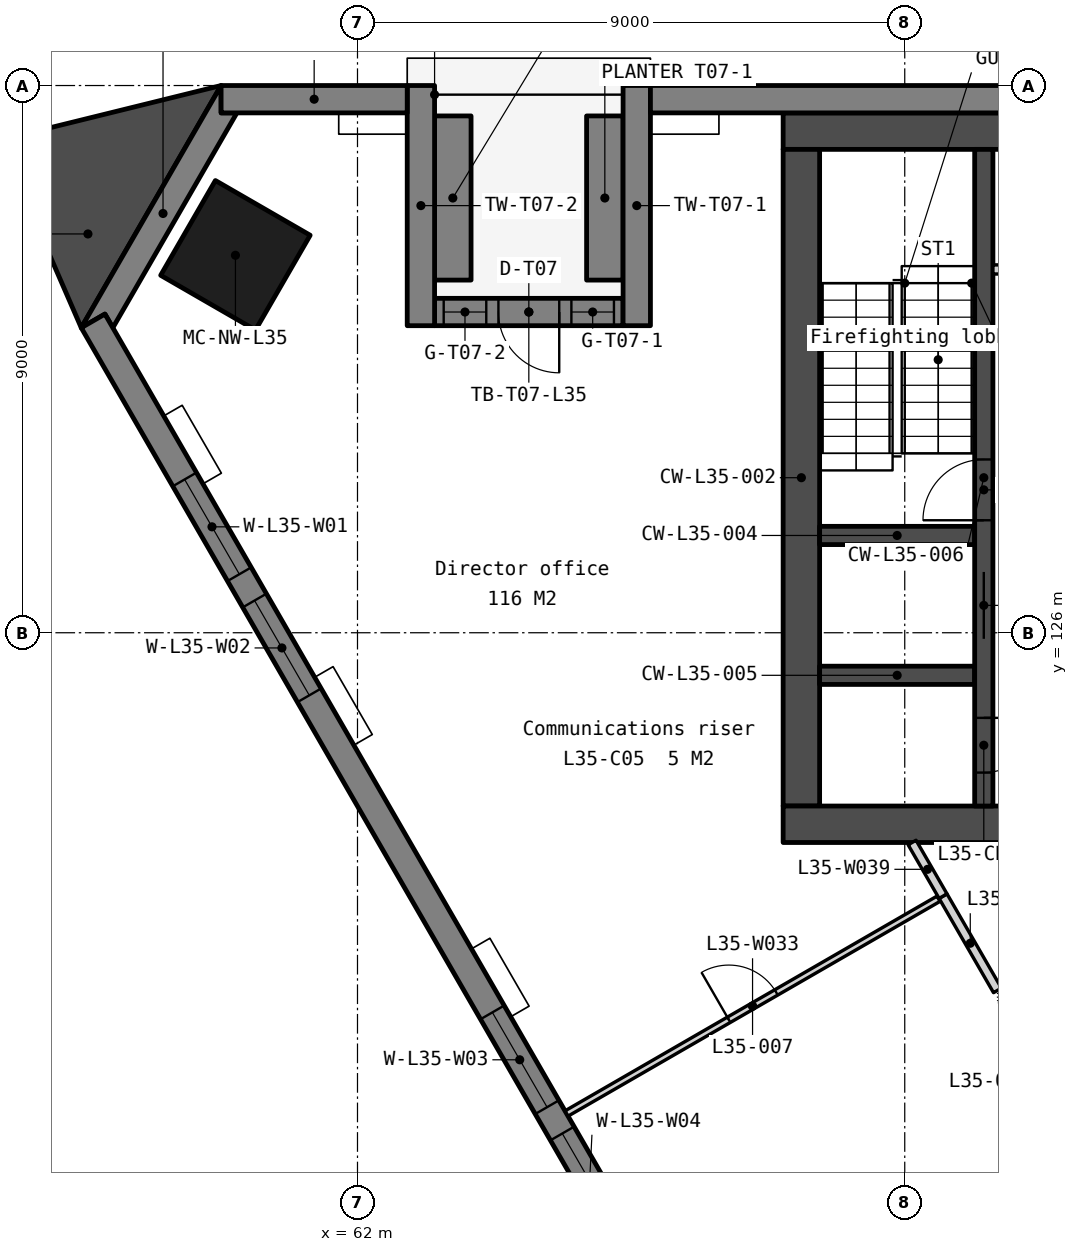
"""IFC4 building model, lengths in metres.
Left out: names, types, materials, properties, quantities, classifications, styles, units other than length and angle.
Written with IfcOpenShell. Run it as: python <this file> out.ifc"""

import sys

from ifc_helpers import new_model, si_unit, direction, frame, frame_2d, origin, origin_2d, place, context, subcontext, project, spatial, polyline, rectangle, outline, extrude, element, fill, save


model = new_model("IFC4")
c1 = context("Model", 3, precision=1e-05, world=origin(), true_north=direction((0.0, 1.0)))
c2 = subcontext(c1, "Body", "Model", "MODEL_VIEW")
j1 = project(units=[si_unit("LENGTHUNIT", "METRE"), si_unit("PLANEANGLEUNIT", "RADIAN")], contexts=[c1])
p1 = place(None, origin())
s1 = spatial("IfcSite", under=j1, at=p1, CompositionType="ELEMENT")
p2 = place(p1, origin())
s2 = spatial("IfcBuilding", under=s1, at=p2, CompositionType="ELEMENT")
p3 = place(p2, frame((0.0, 0.0, 140.3)))
s3 = spatial("IfcBuildingStorey", under=s2, at=p3, CompositionType="ELEMENT", Elevation=140.3)
p4 = place(p3, frame((59.993, 132.208, 0.0), z_axis=(0.0, 0.0, 1.0), x_axis=(-0.5, -0.866025403784, 0.0)))
e1 = element("IfcColumn", 1, at=p4, inside=s3, PredefinedType="COLUMN", context=c2, shape_type="SweptSolid", body=[
    extrude(rectangle(XDim=1.8, YDim=1.8, at=origin_2d()), origin(), (0.0, 0.0, 1.0), 3.9),
])
p5 = place(p3, frame((69.0, 134.25, 0.0), z_axis=(0.0, 0.0, 1.0), x_axis=(1.0, 0.0, 0.0)))
e2 = element("IfcWall", 2, at=p5, inside=s3, PredefinedType="SOLIDWALL", context=c2, shape_type="SweptSolid", body=[
    extrude(rectangle(XDim=22.0, YDim=0.6, at=frame_2d((11.0, 0.0))), origin(), (0.0, 0.0, 1.0), 3.75),
])
p6 = place(p3, frame((69.3, 133.95, 0.0), z_axis=(0.0, 0.0, 1.0), x_axis=(0.0, -1.0, 0.0)))
e3 = element("IfcWall", 3, at=p6, inside=s3, PredefinedType="SOLIDWALL", context=c2, shape_type="SweptSolid", body=[
    extrude(rectangle(XDim=10.8, YDim=0.6, at=frame_2d((5.4, 0.0))), origin(), (0.0, 0.0, 1.0), 3.75),
])
p7 = place(p3, frame((69.0, 122.85, 0.0), z_axis=(0.0, 0.0, 1.0), x_axis=(1.0, 0.0, 0.0)))
e4 = element("IfcWall", 4, at=p7, inside=s3, PredefinedType="SOLIDWALL", context=c2, shape_type="SweptSolid", body=[
    extrude(rectangle(XDim=22.0, YDim=0.6, at=frame_2d((11.0, 0.0))), origin(), (0.0, 0.0, 1.0), 3.75),
])
p8 = place(p7, frame((16.375, 0.0, 0.0)))
e5 = element("IfcOpeningElement", 5, at=p8, cuts=e4, PredefinedType="OPENING", context=c2, shape_type="SweptSolid", body=[
    extrude(rectangle(XDim=1.8, YDim=2.1, at=frame_2d((0.9, 1.05))), frame((0.0, 0.31, 0.0), z_axis=(0.0, -1.0, 0.0), x_axis=(1.0, 0.0, 0.0)), (0.0, 0.0, 1.0), 0.62),
])
p9 = place(p7, frame((3.825, 0.0, 0.0)))
e6 = element("IfcOpeningElement", 6, at=p9, cuts=e4, PredefinedType="OPENING", context=c2, shape_type="SweptSolid", body=[
    extrude(rectangle(XDim=1.8, YDim=2.1, at=frame_2d((0.9, 1.05))), frame((0.0, 0.31, 0.0), z_axis=(0.0, -1.0, 0.0), x_axis=(1.0, 0.0, 0.0)), (0.0, 0.0, 1.0), 0.62),
])
p10 = place(p7, frame((12.85, 0.0, 0.0)))
e7 = element("IfcOpeningElement", 7, at=p10, cuts=e4, PredefinedType="OPENING", context=c2, shape_type="SweptSolid", body=[
    extrude(rectangle(XDim=1.5, YDim=2.1, at=frame_2d((0.75, 1.05))), frame((0.0, 0.31, 0.0), z_axis=(0.0, -1.0, 0.0), x_axis=(1.0, 0.0, 0.0)), (0.0, 0.0, 1.0), 0.62),
])
for number, where, z_axis, x_axis in (
    (8, (69.6, 127.6, 0.0), (0.0, 0.0, 1.0), (1.0, 0.0, 0.0)),
    (9, (69.6, 125.3, 0.0), (0.0, 0.0, 1.0), (1.0, 0.0, 0.0)),
):
    element("IfcWall", number, at=place(p3, frame(where, z_axis=z_axis, x_axis=x_axis)), inside=s3, PredefinedType="SOLIDWALL", context=c2, shape_type="SweptSolid", body=[
        extrude(rectangle(XDim=2.55, YDim=0.3, at=frame_2d((1.275, 0.0))), origin(), (0.0, 0.0, 1.0), 3.75),
    ])
p11 = place(p3, frame((72.3, 133.95, 0.0), z_axis=(0.0, 0.0, 1.0), x_axis=(0.0, -1.0, 0.0)))
e10 = element("IfcWall", 10, at=p11, inside=s3, PredefinedType="SOLIDWALL", context=c2, shape_type="SweptSolid", body=[
    extrude(rectangle(XDim=10.8, YDim=0.3, at=frame_2d((5.4, 0.0))), origin(), (0.0, 0.0, 1.0), 3.75),
])
p12 = place(p11, frame((6.95, 0.0, 0.0)))
e11 = element("IfcOpeningElement", 11, at=p12, cuts=e10, PredefinedType="OPENING", context=c2, shape_type="SweptSolid", body=[
    extrude(rectangle(XDim=1.1, YDim=2.1, at=frame_2d((0.55, 1.05))), frame((0.0, 0.16, 0.0), z_axis=(0.0, -1.0, 0.0), x_axis=(1.0, 0.0, 0.0)), (0.0, 0.0, 1.0), 0.32),
])
p13 = place(p11, frame((9.35, 0.0, 0.0)))
e12 = element("IfcOpeningElement", 12, at=p13, cuts=e10, PredefinedType="OPENING", context=c2, shape_type="SweptSolid", body=[
    extrude(rectangle(XDim=0.9, YDim=2.1, at=frame_2d((0.45, 1.05))), frame((0.0, 0.16, 0.0), z_axis=(0.0, -1.0, 0.0), x_axis=(1.0, 0.0, 0.0)), (0.0, 0.0, 1.0), 0.32),
])
p14 = place(p11, frame((5.1, 0.0, 0.0)))
e13 = element("IfcOpeningElement", 13, at=p14, cuts=e10, PredefinedType="OPENING", context=c2, shape_type="SweptSolid", body=[
    extrude(rectangle(XDim=1.0, YDim=2.1, at=frame_2d((0.5, 1.05))), frame((0.0, 0.16, 0.0), z_axis=(0.0, -1.0, 0.0), x_axis=(1.0, 0.0, 0.0)), (0.0, 0.0, 1.0), 0.32),
])
p15 = place(p3, frame((72.45, 131.975, 0.0), z_axis=(0.0, 0.0, 1.0), x_axis=(1.0, 0.0, 0.0)))
e14 = element("IfcWall", 14, at=p15, inside=s3, PredefinedType="PARTITIONING", context=c2, shape_type="SweptSolid", body=[
    extrude(rectangle(XDim=3.45, YDim=0.15, at=frame_2d((1.725, 0.0))), origin(), (0.0, 0.0, 1.0), 3.75),
])
p16 = place(p15, frame((0.525, 0.0, 0.0)))
e15 = element("IfcOpeningElement", 15, at=p16, cuts=e14, PredefinedType="OPENING", context=c2, shape_type="SweptSolid", body=[
    extrude(rectangle(XDim=1.5, YDim=2.1, at=frame_2d((0.75, 1.05))), frame((0.0, 0.085, 0.0), z_axis=(0.0, -1.0, 0.0), x_axis=(1.0, 0.0, 0.0)), (0.0, 0.0, 1.0), 0.17),
])
p17 = place(p3, frame((0.0, 0.0, -0.15)))
e16 = element("IfcWall", 16, at=p17, inside=s3, PredefinedType="SOLIDWALL", context=c2, shape_type="SweptSolid", body=[
    extrude(outline(polyline([(59.757, 135.0), (59.757, 134.55), (60.017, 134.55), (57.977, 131.016), (57.847, 131.241), (57.457, 131.016), (59.757, 135.0)])), origin(), (0.0, 0.0, 1.0), 3.9),
])
p18 = place(p3, frame((100.243, 134.775, -0.15), z_axis=(0.0, 0.0, 1.0), x_axis=(-1.0, 0.0, 0.0)))
e17 = element("IfcWall", 17, at=p18, inside=s3, PredefinedType="SOLIDWALL", context=c2, shape_type="SweptSolid", body=[
    extrude(outline(polyline([(0.0, 0.0), (0.0, 3.9), (33.425, 3.9), (33.425, 0.0), (0.0, 0.0)])), frame((0.0, 0.225, 0.0), z_axis=(0.0, -1.0, 0.0), x_axis=(1.0, 0.0, 0.0)), (0.0, 0.0, 1.0), 0.45),
])
p19 = place(p18, frame((3.011, 0.0, 0.95)))
e18 = element("IfcOpeningElement", 18, at=p19, cuts=e17, PredefinedType="OPENING", context=c2, shape_type="SweptSolid", body=[
    extrude(rectangle(XDim=1.8, YDim=2.2, at=frame_2d((0.9, 1.1))), frame((0.0, 0.235, 0.0), z_axis=(0.0, -1.0, 0.0), x_axis=(1.0, 0.0, 0.0)), (0.0, 0.0, 1.0), 0.47),
])
p20 = place(p18, frame((5.311, 0.0, 0.95)))
e19 = element("IfcOpeningElement", 19, at=p20, cuts=e17, PredefinedType="OPENING", context=c2, shape_type="SweptSolid", body=[
    extrude(rectangle(XDim=1.8, YDim=2.2, at=frame_2d((0.9, 1.1))), frame((0.0, 0.235, 0.0), z_axis=(0.0, -1.0, 0.0), x_axis=(1.0, 0.0, 0.0)), (0.0, 0.0, 1.0), 0.47),
])
p21 = place(p18, frame((13.132, 0.0, 0.95)))
e20 = element("IfcOpeningElement", 20, at=p21, cuts=e17, PredefinedType="OPENING", context=c2, shape_type="SweptSolid", body=[
    extrude(rectangle(XDim=1.8, YDim=2.2, at=frame_2d((0.9, 1.1))), frame((0.0, 0.235, 0.0), z_axis=(0.0, -1.0, 0.0), x_axis=(1.0, 0.0, 0.0)), (0.0, 0.0, 1.0), 0.47),
])
p22 = place(p18, frame((15.432, 0.0, 0.95)))
e21 = element("IfcOpeningElement", 21, at=p22, cuts=e17, PredefinedType="OPENING", context=c2, shape_type="SweptSolid", body=[
    extrude(rectangle(XDim=1.8, YDim=2.2, at=frame_2d((0.9, 1.1))), frame((0.0, 0.235, 0.0), z_axis=(0.0, -1.0, 0.0), x_axis=(1.0, 0.0, 0.0)), (0.0, 0.0, 1.0), 0.47),
])
p23 = place(p18, frame((23.254, 0.0, 0.95)))
e22 = element("IfcOpeningElement", 22, at=p23, cuts=e17, PredefinedType="OPENING", context=c2, shape_type="SweptSolid", body=[
    extrude(rectangle(XDim=1.8, YDim=2.2, at=frame_2d((0.9, 1.1))), frame((0.0, 0.235, 0.0), z_axis=(0.0, -1.0, 0.0), x_axis=(1.0, 0.0, 0.0)), (0.0, 0.0, 1.0), 0.47),
])
p24 = place(p18, frame((25.554, 0.0, 0.95)))
e23 = element("IfcOpeningElement", 23, at=p24, cuts=e17, PredefinedType="OPENING", context=c2, shape_type="SweptSolid", body=[
    extrude(rectangle(XDim=1.8, YDim=2.2, at=frame_2d((0.9, 1.1))), frame((0.0, 0.235, 0.0), z_axis=(0.0, -1.0, 0.0), x_axis=(1.0, 0.0, 0.0)), (0.0, 0.0, 1.0), 0.47),
])
p25 = place(p3, frame((62.818, 134.775, -0.15), z_axis=(0.0, 0.0, 1.0), x_axis=(-1.0, 0.0, 0.0)))
e24 = element("IfcWall", 24, at=p25, inside=s3, PredefinedType="SOLIDWALL", context=c2, shape_type="SweptSolid", body=[
    extrude(outline(polyline([(3.061, 3.9), (3.061, 0.0), (0.0, 0.0), (0.0, 3.9), (3.061, 3.9)])), frame((0.0, 0.225, 0.0), z_axis=(0.0, -1.0, 0.0), x_axis=(1.0, 0.0, 0.0)), (0.0, 0.0, 1.0), 0.45),
])
p26 = place(p3, frame((57.652, 131.129, -0.15), z_axis=(0.0, 0.0, 1.0), x_axis=(0.499997369791, -0.866026922331, 0.0)))
e25 = element("IfcWall", 25, at=p26, inside=s3, PredefinedType="SOLIDWALL", context=c2, shape_type="SweptSolid", body=[
    extrude(outline(polyline([(40.486, 0.0), (40.486, 3.9), (0.0, 3.9), (0.0, 0.0), (40.486, 0.0)])), frame((0.0, 0.225, 0.0), z_axis=(0.0, -1.0, 0.0), x_axis=(1.0, 0.0, 0.0)), (0.0, 0.0, 1.0), 0.45),
])
p27 = place(p26, frame((3.011, 0.0, 0.95)))
e26 = element("IfcOpeningElement", 26, at=p27, cuts=e25, PredefinedType="OPENING", context=c2, shape_type="SweptSolid", body=[
    extrude(rectangle(XDim=1.8, YDim=2.2, at=frame_2d((0.9, 1.1))), frame((0.0, 0.235, 0.0), z_axis=(0.0, -1.0, 0.0), x_axis=(1.0, 0.0, 0.0)), (0.0, 0.0, 1.0), 0.47),
])
p28 = place(p26, frame((5.311, 0.0, 0.95)))
e27 = element("IfcOpeningElement", 27, at=p28, cuts=e25, PredefinedType="OPENING", context=c2, shape_type="SweptSolid", body=[
    extrude(rectangle(XDim=1.8, YDim=2.2, at=frame_2d((0.9, 1.1))), frame((0.0, 0.235, 0.0), z_axis=(0.0, -1.0, 0.0), x_axis=(1.0, 0.0, 0.0)), (0.0, 0.0, 1.0), 0.47),
])
p29 = place(p26, frame((13.132, 0.0, 0.95)))
e28 = element("IfcOpeningElement", 28, at=p29, cuts=e25, PredefinedType="OPENING", context=c2, shape_type="SweptSolid", body=[
    extrude(rectangle(XDim=1.8, YDim=2.2, at=frame_2d((0.9, 1.1))), frame((0.0, 0.235, 0.0), z_axis=(0.0, -1.0, 0.0), x_axis=(1.0, 0.0, 0.0)), (0.0, 0.0, 1.0), 0.47),
])
p30 = place(p26, frame((15.432, 0.0, 0.95)))
e29 = element("IfcOpeningElement", 29, at=p30, cuts=e25, PredefinedType="OPENING", context=c2, shape_type="SweptSolid", body=[
    extrude(rectangle(XDim=1.8, YDim=2.2, at=frame_2d((0.9, 1.1))), frame((0.0, 0.235, 0.0), z_axis=(0.0, -1.0, 0.0), x_axis=(1.0, 0.0, 0.0)), (0.0, 0.0, 1.0), 0.47),
])
p31 = place(p26, frame((23.254, 0.0, 0.95)))
e30 = element("IfcOpeningElement", 30, at=p31, cuts=e25, PredefinedType="OPENING", context=c2, shape_type="SweptSolid", body=[
    extrude(rectangle(XDim=1.8, YDim=2.2, at=frame_2d((0.9, 1.1))), frame((0.0, 0.235, 0.0), z_axis=(0.0, -1.0, 0.0), x_axis=(1.0, 0.0, 0.0)), (0.0, 0.0, 1.0), 0.47),
])
p32 = place(p26, frame((25.554, 0.0, 0.95)))
e31 = element("IfcOpeningElement", 31, at=p32, cuts=e25, PredefinedType="OPENING", context=c2, shape_type="SweptSolid", body=[
    extrude(rectangle(XDim=1.8, YDim=2.2, at=frame_2d((0.9, 1.1))), frame((0.0, 0.235, 0.0), z_axis=(0.0, -1.0, 0.0), x_axis=(1.0, 0.0, 0.0)), (0.0, 0.0, 1.0), 0.47),
])
p33 = place(p26, frame((33.375, 0.0, 0.95)))
e32 = element("IfcOpeningElement", 32, at=p33, cuts=e25, PredefinedType="OPENING", context=c2, shape_type="SweptSolid", body=[
    extrude(rectangle(XDim=1.8, YDim=2.2, at=frame_2d((0.9, 1.1))), frame((0.0, 0.235, 0.0), z_axis=(0.0, -1.0, 0.0), x_axis=(1.0, 0.0, 0.0)), (0.0, 0.0, 1.0), 0.47),
])
p34 = place(p26, frame((35.675, 0.0, 0.95)))
e33 = element("IfcOpeningElement", 33, at=p34, cuts=e25, PredefinedType="OPENING", context=c2, shape_type="SweptSolid", body=[
    extrude(rectangle(XDim=1.8, YDim=2.2, at=frame_2d((0.9, 1.1))), frame((0.0, 0.235, 0.0), z_axis=(0.0, -1.0, 0.0), x_axis=(1.0, 0.0, 0.0)), (0.0, 0.0, 1.0), 0.47),
])
for number, where, z_axis, x_axis in (
    (34, (66.593, 135.0, 0.0), (0.0, 0.0, 1.0), (0.0, -1.0, 0.0)),
    (35, (63.043, 135.0, 0.0), (0.0, 0.0, 1.0), (0.0, -1.0, 0.0)),
):
    element("IfcWall", number, at=place(p3, frame(where, z_axis=z_axis, x_axis=x_axis)), inside=s3, PredefinedType="SOLIDWALL", context=c2, shape_type="SweptSolid", body=[
        extrude(rectangle(XDim=3.95, YDim=0.45, at=frame_2d((1.975, 0.0))), origin(), (0.0, 0.0, 1.0), 3.072),
    ])
p35 = place(p3, frame((66.368, 131.275, -0.15), z_axis=(0.0, 0.0, 1.0), x_axis=(-1.0, 0.0, 0.0)))
e36 = element("IfcWall", 36, at=p35, inside=s3, PredefinedType="SOLIDWALL", context=c2, shape_type="SweptSolid", body=[
    extrude(rectangle(XDim=3.1, YDim=0.45, at=frame_2d((1.55, 0.0))), origin(), (0.0, 0.0, 1.0), 3.222),
])
p36 = place(p35, frame((1.05, 0.0, 0.15)))
e37 = element("IfcOpeningElement", 37, at=p36, cuts=e36, PredefinedType="OPENING", context=c2, shape_type="SweptSolid", body=[
    extrude(rectangle(XDim=1.0, YDim=2.4, at=frame_2d((0.5, 1.2))), frame((0.0, 0.235, 0.0), z_axis=(0.0, -1.0, 0.0), x_axis=(1.0, 0.0, 0.0)), (0.0, 0.0, 1.0), 0.47),
])
p37 = place(p35, frame((0.15, 0.0, 0.15)))
e38 = element("IfcOpeningElement", 38, at=p37, cuts=e36, PredefinedType="OPENING", context=c2, shape_type="SweptSolid", body=[
    extrude(rectangle(XDim=0.7, YDim=2.4, at=frame_2d((0.35, 1.2))), frame((0.0, 0.235, 0.0), z_axis=(0.0, -1.0, 0.0), x_axis=(1.0, 0.0, 0.0)), (0.0, 0.0, 1.0), 0.47),
])
p38 = place(p35, frame((2.25, 0.0, 0.15)))
e39 = element("IfcOpeningElement", 39, at=p38, cuts=e36, PredefinedType="OPENING", context=c2, shape_type="SweptSolid", body=[
    extrude(rectangle(XDim=0.7, YDim=2.4, at=frame_2d((0.35, 1.2))), frame((0.0, 0.235, 0.0), z_axis=(0.0, -1.0, 0.0), x_axis=(1.0, 0.0, 0.0)), (0.0, 0.0, 1.0), 0.47),
])
for number, where, z_axis, x_axis in (
    (40, (66.068, 134.5, 0.0), (0.0, 0.0, 1.0), (0.0, -1.0, 0.0)),
    (41, (63.568, 134.5, 0.0), (0.0, 0.0, 1.0), (0.0, -1.0, 0.0)),
):
    element("IfcWall", number, at=place(p3, frame(where, z_axis=z_axis, x_axis=x_axis)), inside=s3, PredefinedType="STANDARD", context=c2, shape_type="SweptSolid", body=[
        extrude(rectangle(XDim=2.7, YDim=0.6, at=frame_2d((1.35, 0.0))), origin(), (0.0, 0.0, 1.0), 0.6),
    ])
p39 = place(p3, frame((0.0, 0.0, -0.15)))
e42 = element("IfcWall", 42, at=p39, inside=s3, PredefinedType="SOLIDWALL", context=c2, shape_type="SweptSolid", body=[
    extrude(outline(polyline([(59.757, 135.0), (56.116, 134.102), (57.457, 131.016), (59.757, 135.0)])), origin(), (0.0, 0.0, 1.0), 3.9),
])
p40 = place(p3, frame((67.968, 113.71, 0.0), z_axis=(0.0, 0.0, 1.0), x_axis=(0.866025031136, 0.500000645445, 0.0)))
e43 = element("IfcWall", 43, at=p40, inside=s3, PredefinedType="PARTITIONING", context=c2, shape_type="SweptSolid", body=[
    extrude(rectangle(XDim=7.065, YDim=0.2, at=frame_2d((3.532, 0.0))), origin(), (0.0, 0.0, 1.0), 3.75),
])
p41 = place(p3, frame((65.438, 118.093, 0.0), z_axis=(0.0, 0.0, 1.0), x_axis=(0.866025031136, 0.500000645445, 0.0)))
e44 = element("IfcWall", 44, at=p41, inside=s3, PredefinedType="PARTITIONING", context=c2, shape_type="SweptSolid", body=[
    extrude(rectangle(XDim=7.065, YDim=0.1, at=frame_2d((3.532, 0.0))), origin(), (0.0, 0.0, 1.0), 3.75),
])
p42 = place(p41, frame((3.083, 0.0, 0.0)))
e45 = element("IfcOpeningElement", 45, at=p42, cuts=e44, PredefinedType="OPENING", context=c2, shape_type="SweptSolid", body=[
    extrude(rectangle(XDim=0.9, YDim=2.1, at=frame_2d((0.45, 1.05))), frame((0.0, 0.06, 0.0), z_axis=(0.0, -1.0, 0.0), x_axis=(1.0, 0.0, 0.0)), (0.0, 0.0, 1.0), 0.12),
])
p43 = place(p3, frame((71.63, 121.668, 0.0), z_axis=(0.0, 0.0, 1.0), x_axis=(0.499982180423, -0.866035691677, 0.0)))
e46 = element("IfcWall", 46, at=p43, inside=s3, PredefinedType="PARTITIONING", context=c2, shape_type="SweptSolid", body=[
    extrude(rectangle(XDim=1.79, YDim=0.15, at=frame_2d((0.895, 0.0))), origin(), (0.0, 0.0, 1.0), 3.75),
])
p44 = place(p3, frame((71.121, 122.55, 0.0), z_axis=(0.0, 0.0, 1.0), x_axis=(0.500006018292, -0.866021929094, 0.0)))
e47 = element("IfcWall", 47, at=p44, inside=s3, PredefinedType="PARTITIONING", context=c2, shape_type="SweptSolid", body=[
    extrude(rectangle(XDim=1.019, YDim=0.15, at=frame_2d((0.509, 0.0))), origin(), (0.0, 0.0, 1.0), 3.75),
])
p45 = place(p12, origin())
e48 = element("IfcDoor", 48, at=p45, inside=s3, OperationType="SLIDING_TO_LEFT", PredefinedType="DOOR", context=c2, shape_type="SweptSolid", body=[
    extrude(rectangle(XDim=1.1, YDim=2.1, at=frame_2d((0.55, 1.05))), frame((0.0, 0.025, 0.0), z_axis=(0.0, -1.0, 0.0), x_axis=(1.0, 0.0, 0.0)), (0.0, 0.0, 1.0), 0.05),
])
fill(e11, e48)
p46 = place(p13, origin())
e49 = element("IfcDoor", 49, at=p46, inside=s3, OperationType="SINGLE_SWING_LEFT", PredefinedType="DOOR", context=c2, shape_type="SweptSolid", body=[
    extrude(rectangle(XDim=0.9, YDim=2.1, at=frame_2d((0.45, 1.05))), frame((0.0, 0.025, 0.0), z_axis=(0.0, -1.0, 0.0), x_axis=(1.0, 0.0, 0.0)), (0.0, 0.0, 1.0), 0.05),
])
fill(e12, e49)
p47 = place(p14, origin())
e50 = element("IfcDoor", 50, at=p47, inside=s3, OperationType="SINGLE_SWING_RIGHT", PredefinedType="DOOR", context=c2, shape_type="SweptSolid", body=[
    extrude(rectangle(XDim=1.0, YDim=2.1, at=frame_2d((0.5, 1.05))), frame((0.0, 0.025, 0.0), z_axis=(0.0, -1.0, 0.0), x_axis=(1.0, 0.0, 0.0)), (0.0, 0.0, 1.0), 0.05),
])
fill(e13, e50)
p48 = place(p27, origin())
e51 = element("IfcWindow", 51, at=p48, inside=s3, PartitioningType="SINGLE_PANEL", PredefinedType="WINDOW", context=c2, shape_type="SweptSolid", body=[
    extrude(rectangle(XDim=1.8, YDim=2.2, at=frame_2d((0.9, 1.1))), frame((0.0, 0.03, 0.0), z_axis=(0.0, -1.0, 0.0), x_axis=(1.0, 0.0, 0.0)), (0.0, 0.0, 1.0), 0.06),
])
fill(e26, e51)
p49 = place(p28, origin())
e52 = element("IfcWindow", 52, at=p49, inside=s3, PartitioningType="SINGLE_PANEL", PredefinedType="WINDOW", context=c2, shape_type="SweptSolid", body=[
    extrude(rectangle(XDim=1.8, YDim=2.2, at=frame_2d((0.9, 1.1))), frame((0.0, 0.03, 0.0), z_axis=(0.0, -1.0, 0.0), x_axis=(1.0, 0.0, 0.0)), (0.0, 0.0, 1.0), 0.06),
])
fill(e27, e52)
p50 = place(p29, origin())
e53 = element("IfcWindow", 53, at=p50, inside=s3, PartitioningType="SINGLE_PANEL", PredefinedType="WINDOW", context=c2, shape_type="SweptSolid", body=[
    extrude(rectangle(XDim=1.8, YDim=2.2, at=frame_2d((0.9, 1.1))), frame((0.0, 0.03, 0.0), z_axis=(0.0, -1.0, 0.0), x_axis=(1.0, 0.0, 0.0)), (0.0, 0.0, 1.0), 0.06),
])
fill(e28, e53)
p51 = place(p30, origin())
e54 = element("IfcWindow", 54, at=p51, inside=s3, PartitioningType="SINGLE_PANEL", PredefinedType="WINDOW", context=c2, shape_type="SweptSolid", body=[
    extrude(rectangle(XDim=1.8, YDim=2.2, at=frame_2d((0.9, 1.1))), frame((0.0, 0.03, 0.0), z_axis=(0.0, -1.0, 0.0), x_axis=(1.0, 0.0, 0.0)), (0.0, 0.0, 1.0), 0.06),
])
fill(e29, e54)
p52 = place(p36, origin())
e55 = element("IfcDoor", 55, at=p52, inside=s3, OperationType="SINGLE_SWING_LEFT", PredefinedType="DOOR", context=c2, shape_type="SweptSolid", body=[
    extrude(rectangle(XDim=1.0, YDim=2.4, at=frame_2d((0.5, 1.2))), frame((0.0, 0.025, 0.0), z_axis=(0.0, -1.0, 0.0), x_axis=(1.0, 0.0, 0.0)), (0.0, 0.0, 1.0), 0.05),
])
fill(e37, e55)
p53 = place(p37, origin())
e56 = element("IfcWindow", 56, at=p53, inside=s3, PartitioningType="SINGLE_PANEL", PredefinedType="WINDOW", context=c2, shape_type="SweptSolid", body=[
    extrude(rectangle(XDim=0.7, YDim=2.4, at=frame_2d((0.35, 1.2))), frame((0.0, 0.03, 0.0), z_axis=(0.0, -1.0, 0.0), x_axis=(1.0, 0.0, 0.0)), (0.0, 0.0, 1.0), 0.06),
])
fill(e38, e56)
p54 = place(p38, origin())
e57 = element("IfcWindow", 57, at=p54, inside=s3, PartitioningType="SINGLE_PANEL", PredefinedType="WINDOW", context=c2, shape_type="SweptSolid", body=[
    extrude(rectangle(XDim=0.7, YDim=2.4, at=frame_2d((0.35, 1.2))), frame((0.0, 0.03, 0.0), z_axis=(0.0, -1.0, 0.0), x_axis=(1.0, 0.0, 0.0)), (0.0, 0.0, 1.0), 0.06),
])
fill(e39, e57)
p55 = place(p42, origin())
e58 = element("IfcDoor", 58, at=p55, inside=s3, OperationType="SINGLE_SWING_LEFT", PredefinedType="DOOR", context=c2, shape_type="SweptSolid", body=[
    extrude(rectangle(XDim=0.9, YDim=2.1, at=frame_2d((0.45, 1.05))), frame((0.0, 0.025, 0.0), z_axis=(0.0, -1.0, 0.0), x_axis=(1.0, 0.0, 0.0)), (0.0, 0.0, 1.0), 0.05),
])
fill(e45, e58)
save(model, sys.argv[1])
